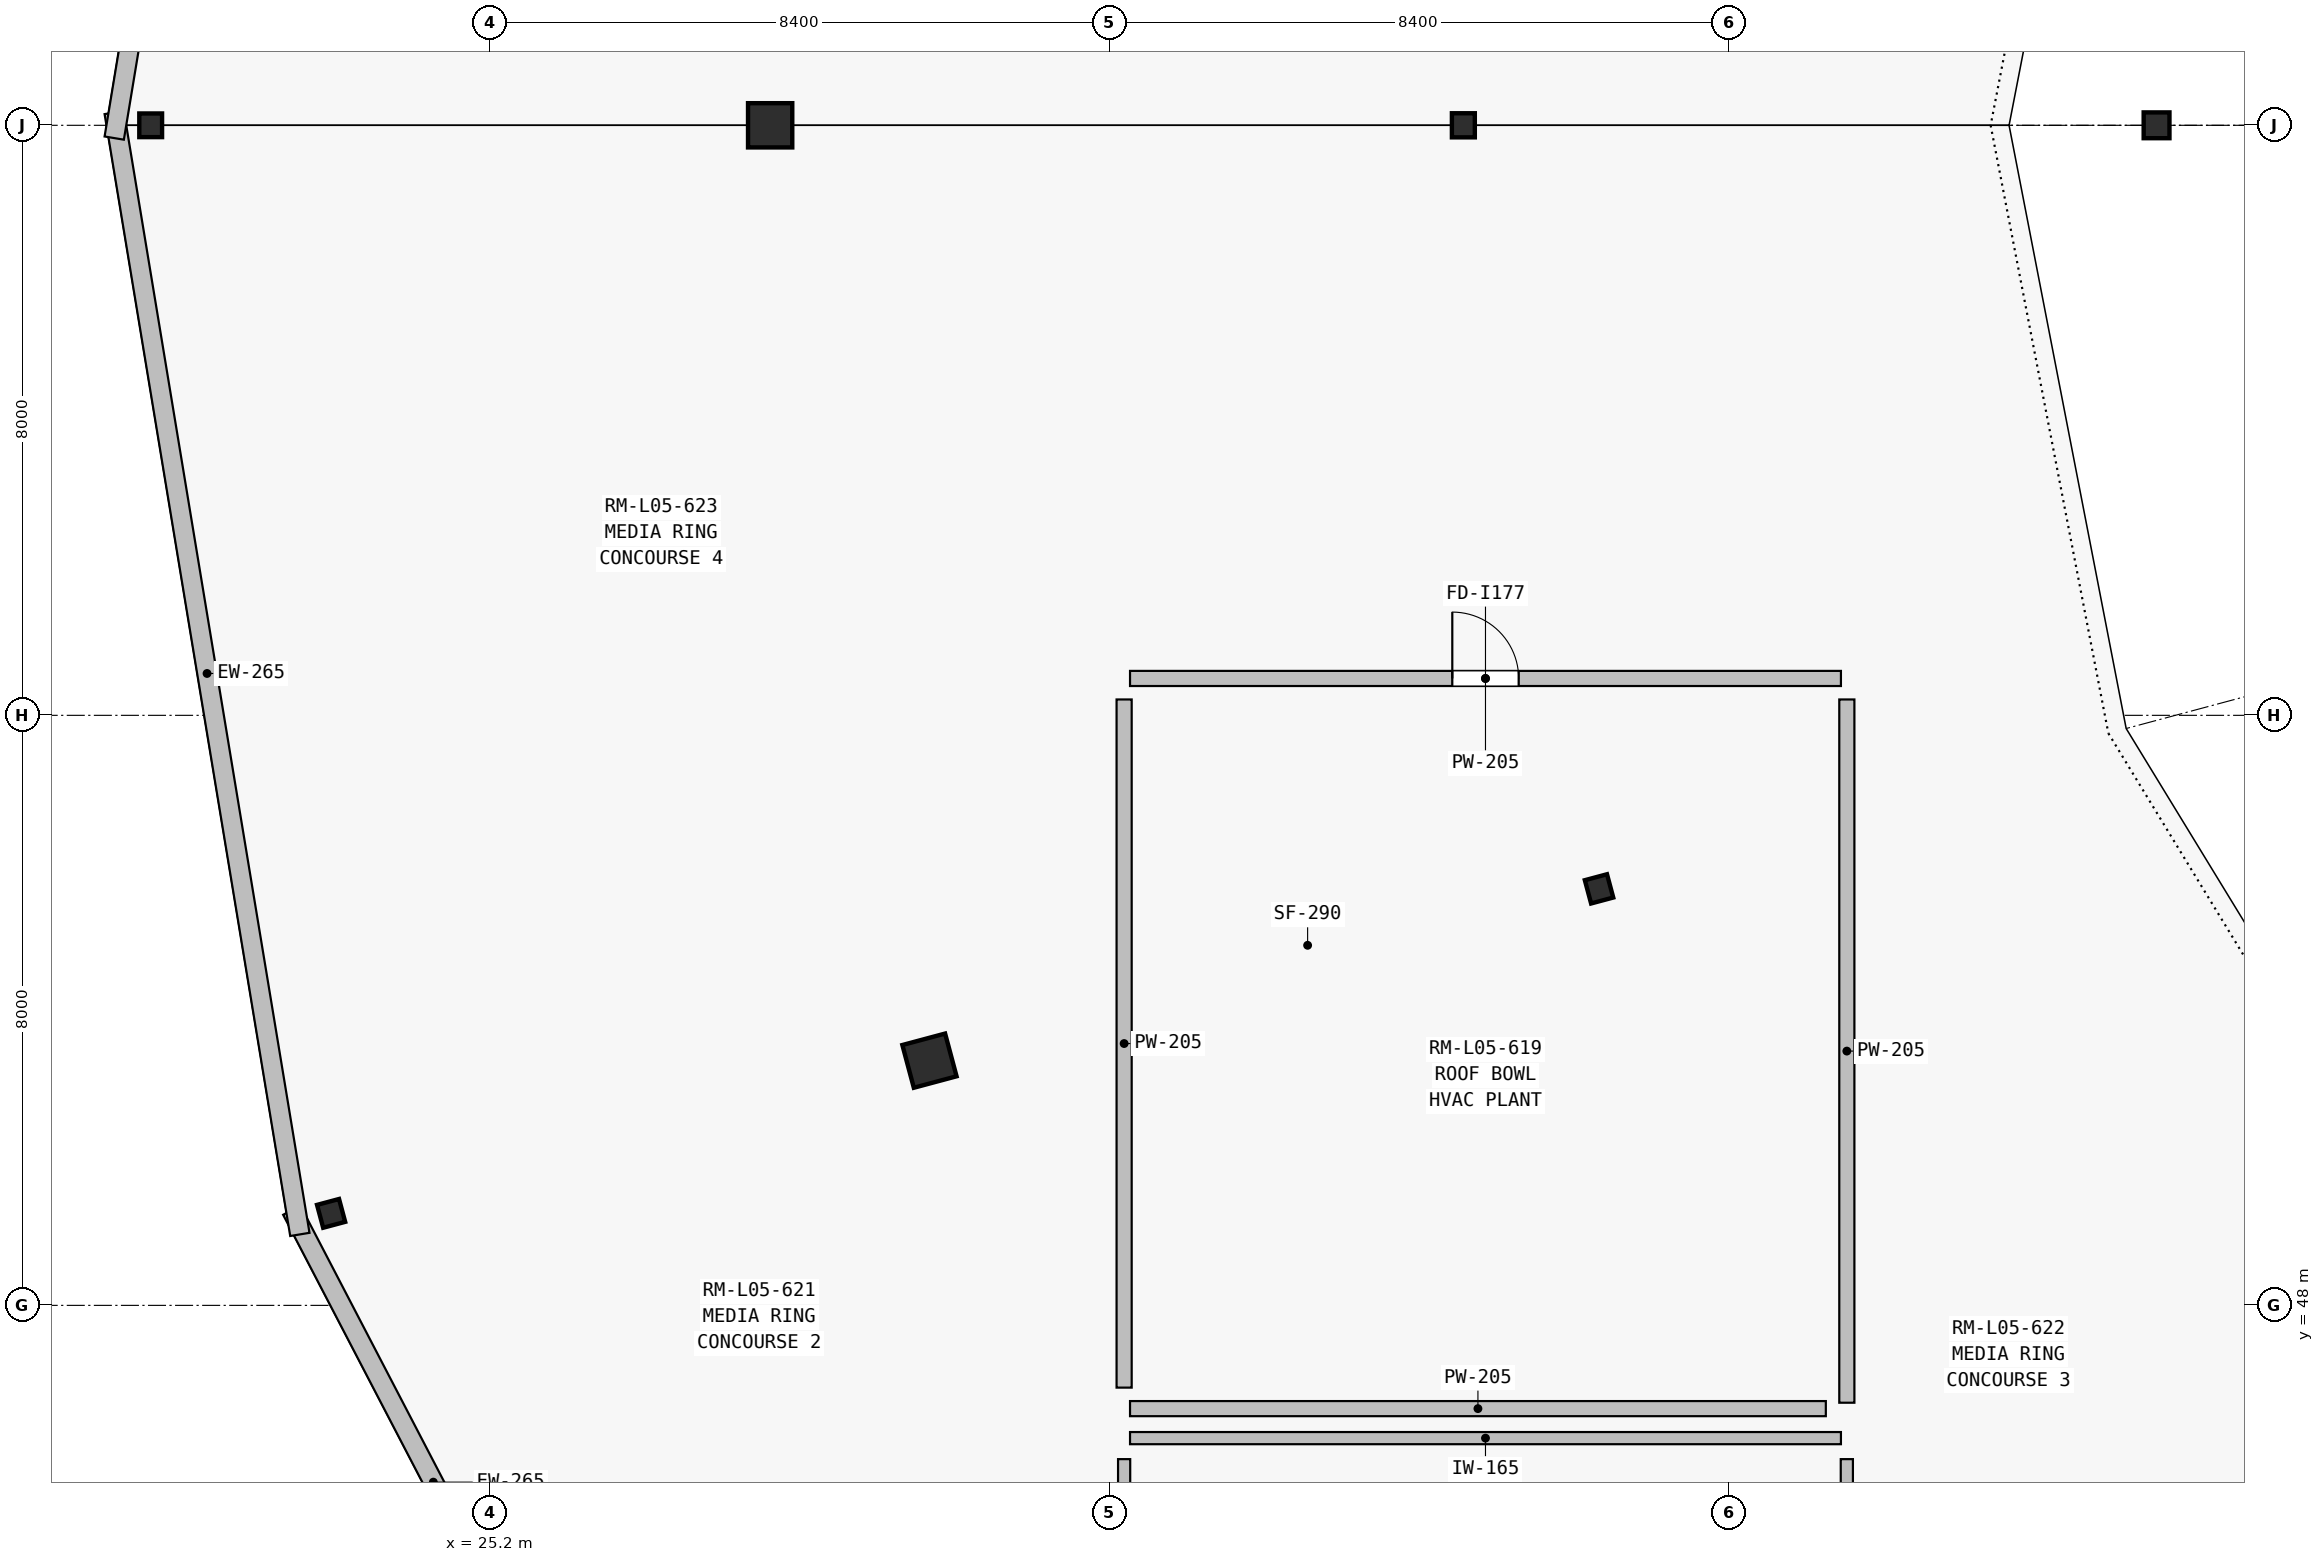
"""IFC4 building model, lengths in metres.
Left out: names, types, materials, properties, quantities, classifications, styles, units other than length and angle.
Written with IfcOpenShell. Run it as: python <this file> out.ifc"""

import sys

from ifc_helpers import new_model, si_unit, direction, frame, frame_2d, origin, origin_2d, place, context, subcontext, project, spatial, rectangle, i_section, extrude, element, fill, save


model = new_model("IFC4")
c1 = context("Model", 3, precision=1e-05, world=origin(), true_north=direction((0.0, 1.0)))
c2 = subcontext(c1, "Body", "Model", "MODEL_VIEW")
j1 = project(units=[si_unit("LENGTHUNIT", "METRE"), si_unit("PLANEANGLEUNIT", "RADIAN")], contexts=[c1])
p1 = place(None, origin())
s1 = spatial("IfcSite", under=j1, at=p1, CompositionType="ELEMENT")
p2 = place(p1, origin())
s2 = spatial("IfcBuilding", under=s1, at=p2, CompositionType="ELEMENT")
p3 = place(p2, frame((0.0, 0.0, 23.4)))
s3 = spatial("IfcBuildingStorey", under=s2, at=p3, CompositionType="ELEMENT", Elevation=23.4)
for number, where, z_axis, x_axis in (
    (1, (38.4, 64.0, 0.0), (0.0, 0.0, 1.0), (-1.0, 0.0, 0.0)),
    (2, (40.24, 53.647, 0.0), (0.0, 0.0, 1.0), (-0.966, -0.259, 0.0)),
):
    element("IfcColumn", number, at=place(p3, frame(where, z_axis=z_axis, x_axis=x_axis)), inside=s3, PredefinedType="COLUMN", context=c2, shape_type="SweptSolid", body=[
        extrude(i_section(OverallWidth=0.311, OverallDepth=0.327, WebThickness=0.016, FlangeThickness=0.025, at=origin_2d()), origin(), (0.0, 0.0, 1.0), 3.15),
    ])
for number, where, z_axis, x_axis in (
    (3, (29.0, 64.0, 0.0), (0.0, 0.0, 1.0), (-1.0, 0.0, 0.0)),
    (4, (31.16, 51.318, 0.0), (0.0, 0.0, 1.0), (-0.966, -0.259, 0.0)),
):
    element("IfcColumn", number, at=place(p3, frame(where, z_axis=z_axis, x_axis=x_axis)), inside=s3, PredefinedType="COLUMN", context=c2, shape_type="SweptSolid", body=[
        extrude(rectangle(XDim=0.6, YDim=0.6, at=origin_2d()), origin(), (0.0, 0.0, 1.0), 3.15),
    ])
for number, where, z_axis, x_axis in (
    (5, (20.6, 64.0, 0.0), (0.0, 0.0, 1.0), (-1.0, 0.0, 0.0)),
    (6, (23.046, 49.247, 0.0), (0.0, 0.0, 1.0), (-0.966, -0.259, 0.0)),
):
    element("IfcColumn", number, at=place(p3, frame(where, z_axis=z_axis, x_axis=x_axis)), inside=s3, PredefinedType="COLUMN", context=c2, shape_type="SweptSolid", body=[
        extrude(i_section(OverallWidth=0.309, OverallDepth=0.321, WebThickness=0.014, FlangeThickness=0.022, at=origin_2d()), origin(), (0.0, 0.0, 1.0), 3.32),
    ])
p4 = place(p3, frame((47.8, 64.0, 0.0), z_axis=(0.0, 0.0, 1.0), x_axis=(-1.0, 0.0, 0.0)))
e7 = element("IfcColumn", 7, at=p4, inside=s3, PredefinedType="COLUMN", context=c2, shape_type="SweptSolid", body=[
    extrude(i_section(OverallWidth=0.35, OverallDepth=0.35, WebThickness=0.014, FlangeThickness=0.024, at=origin_2d()), origin(), (0.0, 0.0, 1.0), 2.15),
])
p5 = place(p3, frame((29.888, 35.125, 0.0), z_axis=(0.0, 0.0, 1.0), x_axis=(-0.461805637467, 0.886981145912, 0.0)))
e8 = element("IfcWall", 8, at=p5, inside=s3, PredefinedType="SOLIDWALL", context=c2, shape_type="SweptSolid", body=[
    extrude(rectangle(XDim=15.969, YDim=0.265, at=frame_2d((7.985, 0.0))), origin(), (0.0, 0.0, 1.0), 3.18),
])
p6 = place(p5, frame((7.25, 0.0, 0.75)))
e9 = element("IfcOpeningElement", 9, at=p6, cuts=e8, PredefinedType="OPENING", context=c2, shape_type="SweptSolid", body=[
    extrude(rectangle(XDim=1.2, YDim=2.2, at=frame_2d((0.6, 1.1))), frame((0.0, 0.142, 0.0), z_axis=(0.0, -1.0, 0.0), x_axis=(1.0, 0.0, 0.0)), (0.0, 0.0, 1.0), 0.285),
])
p7 = place(p3, frame((22.623, 48.962, 0.0), z_axis=(0.0, 0.0, 1.0), x_axis=(-0.163253657255, 0.986584128898, 0.0)))
e10 = element("IfcWall", 10, at=p7, inside=s3, PredefinedType="SOLIDWALL", context=c2, shape_type="SweptSolid", body=[
    extrude(rectangle(XDim=15.418, YDim=0.265, at=frame_2d((7.709, 0.0))), origin(), (0.0, 0.0, 1.0), 3.18),
])
p8 = place(p3, frame((20.106, 63.827, 0.0), z_axis=(0.0, 0.0, 1.0), x_axis=(0.163253657255, 0.986584128898, 0.0)))
e11 = element("IfcWall", 11, at=p8, inside=s3, PredefinedType="SOLIDWALL", context=c2, shape_type="SweptSolid", body=[
    extrude(rectangle(XDim=15.418, YDim=0.265, at=frame_2d((7.709, 0.0))), origin(), (0.0, 0.0, 1.0), 3.18),
])
p9 = place(p8, frame((2.65, 0.0, 0.75)))
e12 = element("IfcOpeningElement", 12, at=p9, cuts=e11, PredefinedType="OPENING", context=c2, shape_type="SweptSolid", body=[
    extrude(rectangle(XDim=1.2, YDim=2.2, at=frame_2d((0.6, 1.1))), frame((0.0, 0.142, 0.0), z_axis=(0.0, -1.0, 0.0), x_axis=(1.0, 0.0, 0.0)), (0.0, 0.0, 1.0), 0.285),
])
p10 = place(p3, frame((33.88, 46.2, 0.0), z_axis=(0.0, 0.0, 1.0), x_axis=(1.0, 0.0, 0.0)))
e13 = element("IfcWall", 13, at=p10, inside=s3, PredefinedType="PARTITIONING", context=c2, shape_type="SweptSolid", body=[
    extrude(rectangle(XDim=9.64, YDim=0.165, at=frame_2d((4.82, 0.0))), origin(), (0.0, 0.0, 1.0), 3.18),
])
p11 = place(p3, frame((43.6, 45.915, 0.0), z_axis=(0.0, 0.0, 1.0), x_axis=(0.0, -1.0, 0.0)))
e14 = element("IfcWall", 14, at=p11, inside=s3, PredefinedType="PARTITIONING", context=c2, shape_type="SweptSolid", body=[
    extrude(rectangle(XDim=9.435, YDim=0.165, at=frame_2d((4.718, 0.0))), origin(), (0.0, 0.0, 1.0), 3.18),
])
p12 = place(p11, frame((4.093, 0.0, 0.0)))
e15 = element("IfcOpeningElement", 15, at=p12, cuts=e14, PredefinedType="OPENING", context=c2, shape_type="SweptSolid", body=[
    extrude(rectangle(XDim=1.25, YDim=2.25, at=frame_2d((0.625, 1.125))), frame((0.0, 0.093, 0.0), z_axis=(0.0, -1.0, 0.0), x_axis=(1.0, 0.0, 0.0)), (0.0, 0.0, 1.0), 0.185),
])
p13 = place(p3, frame((33.8, 36.685, 0.0), z_axis=(0.0, 0.0, 1.0), x_axis=(0.0, 1.0, 0.0)))
e16 = element("IfcWall", 16, at=p13, inside=s3, PredefinedType="PARTITIONING", context=c2, shape_type="SweptSolid", body=[
    extrude(rectangle(XDim=9.23, YDim=0.165, at=frame_2d((4.615, 0.0))), origin(), (0.0, 0.0, 1.0), 3.18),
])
p14 = place(p3, frame((33.88, 56.5, 0.0), z_axis=(0.0, 0.0, 1.0), x_axis=(1.0, 0.0, 0.0)))
e17 = element("IfcWall", 17, at=p14, inside=s3, PredefinedType="SOLIDWALL", context=c2, shape_type="SweptSolid", body=[
    extrude(rectangle(XDim=9.64, YDim=0.205, at=frame_2d((4.82, 0.0))), origin(), (0.0, 0.0, 1.0), 2.445),
])
p15 = place(p14, frame((4.37, 0.0, 0.0)))
e18 = element("IfcOpeningElement", 18, at=p15, cuts=e17, PredefinedType="OPENING", context=c2, shape_type="SweptSolid", body=[
    extrude(rectangle(XDim=0.9, YDim=2.1, at=frame_2d((0.45, 1.05))), frame((0.0, 0.113, 0.0), z_axis=(0.0, -1.0, 0.0), x_axis=(1.0, 0.0, 0.0)), (0.0, 0.0, 1.0), 0.225),
])
p16 = place(p3, frame((43.6, 56.215, 0.0), z_axis=(0.0, 0.0, 1.0), x_axis=(0.0, -1.0, 0.0)))
e19 = element("IfcWall", 19, at=p16, inside=s3, PredefinedType="SOLIDWALL", context=c2, shape_type="SweptSolid", body=[
    extrude(rectangle(XDim=9.535, YDim=0.205, at=frame_2d((4.768, 0.0))), origin(), (0.0, 0.0, 1.0), 2.445),
])
p17 = place(p3, frame((43.315, 46.6, 0.0), z_axis=(0.0, 0.0, 1.0), x_axis=(-1.0, 0.0, 0.0)))
e20 = element("IfcWall", 20, at=p17, inside=s3, PredefinedType="SOLIDWALL", context=c2, shape_type="SweptSolid", body=[
    extrude(rectangle(XDim=9.435, YDim=0.205, at=frame_2d((4.718, 0.0))), origin(), (0.0, 0.0, 1.0), 3.18),
])
p18 = place(p3, frame((33.8, 46.885, 0.0), z_axis=(0.0, 0.0, 1.0), x_axis=(0.0, 1.0, 0.0)))
e21 = element("IfcWall", 21, at=p18, inside=s3, PredefinedType="SOLIDWALL", context=c2, shape_type="SweptSolid", body=[
    extrude(rectangle(XDim=9.33, YDim=0.205, at=frame_2d((4.665, 0.0))), origin(), (0.0, 0.0, 1.0), 3.18),
])
p19 = place(p15, origin())
e22 = element("IfcDoor", 22, at=p19, inside=s3, OperationType="SINGLE_SWING_LEFT", PredefinedType="DOOR", context=c2, shape_type="SweptSolid", body=[
    extrude(rectangle(XDim=0.9, YDim=2.1, at=frame_2d((0.45, 1.05))), frame((0.0, 0.025, 0.0), z_axis=(0.0, -1.0, 0.0), x_axis=(1.0, 0.0, 0.0)), (0.0, 0.0, 1.0), 0.05),
])
fill(e18, e22)
save(model, sys.argv[1])
